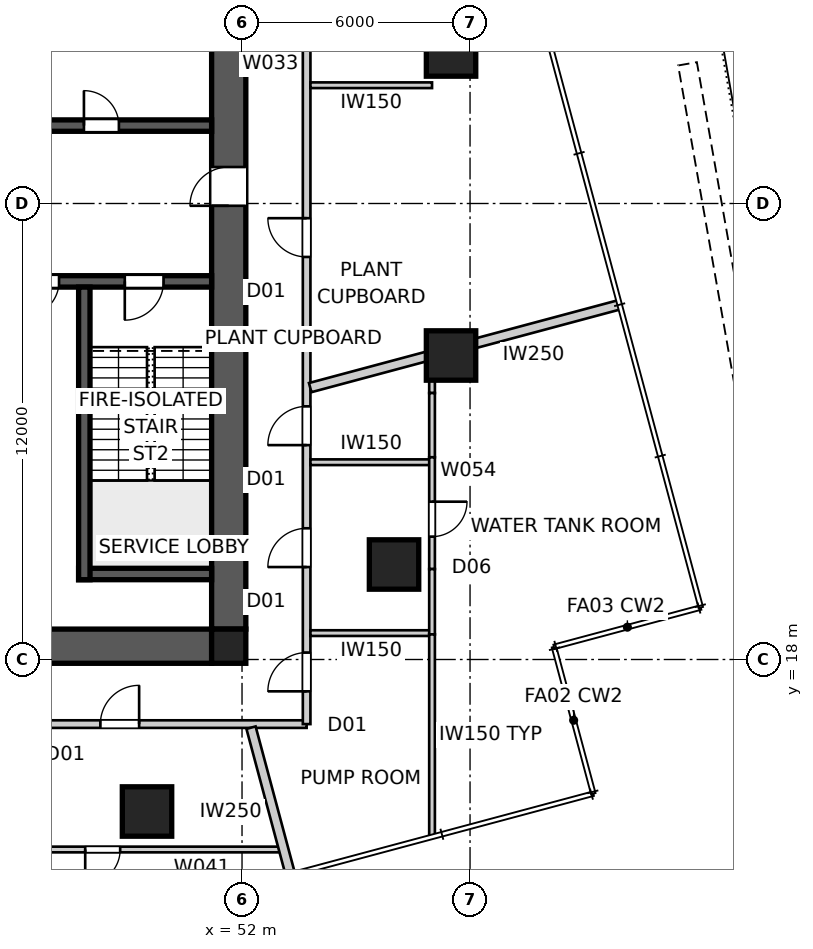
"""IFC4 building model, lengths in metres.
Left out: names, types, materials, properties, quantities, classifications, styles, units other than length and angle.
Written with IfcOpenShell. Run it as: python <this file> out.ifc"""

import sys

from ifc_helpers import new_model, si_unit, direction, frame, frame_2d, origin, origin_2d, place, context, subcontext, project, spatial, polyline, rectangle, outline, extrude, element, fill, save


model = new_model("IFC4")
c1 = context("Model", 3, precision=1e-05, world=origin(), true_north=direction((0.0, 1.0)))
c2 = subcontext(c1, "Body", "Model", "MODEL_VIEW")
j1 = project(units=[si_unit("LENGTHUNIT", "METRE"), si_unit("PLANEANGLEUNIT", "RADIAN")], contexts=[c1])
p1 = place(None, origin())
s1 = spatial("IfcSite", under=j1, at=p1, CompositionType="ELEMENT")
p2 = place(p1, origin())
s2 = spatial("IfcBuilding", under=s1, at=p2, CompositionType="ELEMENT")
p3 = place(p2, frame((0.0, 0.0, 106.6)))
s3 = spatial("IfcBuildingStorey", under=s2, at=p3, CompositionType="ELEMENT", Elevation=106.6)
p4 = place(p3, frame((51.2, 18.35, 0.0), z_axis=(0.0, 0.0, 1.0), x_axis=(-1.0, 0.0, 0.0)))
e1 = element("IfcWall", 1, at=p4, inside=s3, PredefinedType="SHEAR", context=c2, shape_type="SweptSolid", body=[
    extrude(outline(polyline([(0.0, -0.45), (22.4, -0.45), (22.4, -0.025), (22.85, -0.025), (22.85, 0.025), (22.4, 0.025), (22.4, 0.45), (0.0, 0.45), (0.0, 0.025), (-0.45, 0.025), (-0.45, -0.025), (0.0, -0.025), (0.0, -0.45)])), origin(), (0.0, 0.0, 1.0), 5.0),
])
p5 = place(p3, frame((51.65, 18.8, 0.0), z_axis=(0.0, 0.0, 1.0), x_axis=(0.0, 1.0, 0.0)))
e2 = element("IfcWall", 2, at=p5, inside=s3, PredefinedType="SHEAR", context=c2, shape_type="SweptSolid", body=[
    extrude(outline(polyline([(0.0, -0.45), (22.4, -0.45), (22.4, -0.025), (22.85, -0.025), (22.85, 0.025), (22.4, 0.025), (22.4, 0.45), (0.0, 0.45), (0.0, 0.025), (-0.45, 0.025), (-0.45, -0.025), (0.0, -0.025), (0.0, -0.45)])), origin(), (0.0, 0.0, 1.0), 5.0),
])
p6 = place(p5, frame((11.14, 0.0, 0.0)))
e3 = element("IfcOpeningElement", 3, at=p6, cuts=e2, PredefinedType="OPENING", context=c2, shape_type="SweptSolid", body=[
    extrude(rectangle(XDim=1.02, YDim=2.4, at=frame_2d((0.51, 1.2))), frame((0.0, 0.46, 0.0), z_axis=(0.0, -1.0, 0.0), x_axis=(1.0, 0.0, 0.0)), (0.0, 0.0, 1.0), 0.92),
])
p7 = place(p3, frame((28.8, 32.05, 0.0), z_axis=(0.0, 0.0, 1.0), x_axis=(1.0, 0.0, 0.0)))
e4 = element("IfcWall", 4, at=p7, inside=s3, PredefinedType="SHEAR", context=c2, shape_type="SweptSolid", body=[
    extrude(rectangle(XDim=22.4, YDim=0.3, at=frame_2d((11.2, 0.0))), origin(), (0.0, 0.0, 1.0), 5.0),
])
p8 = place(p7, frame((19.04, 0.0, 0.0)))
e5 = element("IfcOpeningElement", 5, at=p8, cuts=e4, PredefinedType="OPENING", context=c2, shape_type="SweptSolid", body=[
    extrude(rectangle(XDim=0.92, YDim=2.1, at=frame_2d((0.46, 1.05))), frame((0.0, 0.16, 0.0), z_axis=(0.0, -1.0, 0.0), x_axis=(1.0, 0.0, 0.0)), (0.0, 0.0, 1.0), 0.32),
])
p9 = place(p7, frame((1.265, 0.0, 0.0)))
e6 = element("IfcOpeningElement", 6, at=p9, cuts=e4, PredefinedType="OPENING", context=c2, shape_type="SweptSolid", body=[
    extrude(rectangle(XDim=1.02, YDim=2.1, at=frame_2d((0.51, 1.05))), frame((0.0, 0.16, 0.0), z_axis=(0.0, -1.0, 0.0), x_axis=(1.0, 0.0, 0.0)), (0.0, 0.0, 1.0), 0.32),
])
p10 = place(p7, frame((4.015, 0.0, 0.0)))
e7 = element("IfcOpeningElement", 7, at=p10, cuts=e4, PredefinedType="OPENING", context=c2, shape_type="SweptSolid", body=[
    extrude(rectangle(XDim=0.92, YDim=2.1, at=frame_2d((0.46, 1.05))), frame((0.0, 0.16, 0.0), z_axis=(0.0, -1.0, 0.0), x_axis=(1.0, 0.0, 0.0)), (0.0, 0.0, 1.0), 0.32),
])
p11 = place(p7, frame((6.45, 0.0, 0.0)))
e8 = element("IfcOpeningElement", 8, at=p11, cuts=e4, PredefinedType="OPENING", context=c2, shape_type="SweptSolid", body=[
    extrude(rectangle(XDim=1.1, YDim=2.1, at=frame_2d((0.55, 1.05))), frame((0.0, 0.16, 0.0), z_axis=(0.0, -1.0, 0.0), x_axis=(1.0, 0.0, 0.0)), (0.0, 0.0, 1.0), 0.32),
])
p12 = place(p7, frame((9.25, 0.0, 0.0)))
e9 = element("IfcOpeningElement", 9, at=p12, cuts=e4, PredefinedType="OPENING", context=c2, shape_type="SweptSolid", body=[
    extrude(rectangle(XDim=1.1, YDim=2.1, at=frame_2d((0.55, 1.05))), frame((0.0, 0.16, 0.0), z_axis=(0.0, -1.0, 0.0), x_axis=(1.0, 0.0, 0.0)), (0.0, 0.0, 1.0), 0.32),
])
p13 = place(p7, frame((14.85, 0.0, 0.0)))
e10 = element("IfcOpeningElement", 10, at=p13, cuts=e4, PredefinedType="OPENING", context=c2, shape_type="SweptSolid", body=[
    extrude(rectangle(XDim=1.1, YDim=2.1, at=frame_2d((0.55, 1.05))), frame((0.0, 0.16, 0.0), z_axis=(0.0, -1.0, 0.0), x_axis=(1.0, 0.0, 0.0)), (0.0, 0.0, 1.0), 0.32),
])
p14 = place(p3, frame((51.2, 27.95, 0.0), z_axis=(0.0, 0.0, 1.0), x_axis=(-1.0, 0.0, 0.0)))
e11 = element("IfcWall", 11, at=p14, inside=s3, PredefinedType="SHEAR", context=c2, shape_type="SweptSolid", body=[
    extrude(rectangle(XDim=22.4, YDim=0.3, at=frame_2d((11.2, 0.0))), origin(), (0.0, 0.0, 1.0), 5.0),
])
p15 = place(p14, frame((19.04, 0.0, 0.0)))
e12 = element("IfcOpeningElement", 12, at=p15, cuts=e11, PredefinedType="OPENING", context=c2, shape_type="SweptSolid", body=[
    extrude(rectangle(XDim=0.92, YDim=2.1, at=frame_2d((0.46, 1.05))), frame((0.0, 0.16, 0.0), z_axis=(0.0, -1.0, 0.0), x_axis=(1.0, 0.0, 0.0)), (0.0, 0.0, 1.0), 0.32),
])
p16 = place(p14, frame((1.265, 0.0, 0.0)))
e13 = element("IfcOpeningElement", 13, at=p16, cuts=e11, PredefinedType="OPENING", context=c2, shape_type="SweptSolid", body=[
    extrude(rectangle(XDim=1.02, YDim=2.1, at=frame_2d((0.51, 1.05))), frame((0.0, 0.16, 0.0), z_axis=(0.0, -1.0, 0.0), x_axis=(1.0, 0.0, 0.0)), (0.0, 0.0, 1.0), 0.32),
])
p17 = place(p14, frame((4.015, 0.0, 0.0)))
e14 = element("IfcOpeningElement", 14, at=p17, cuts=e11, PredefinedType="OPENING", context=c2, shape_type="SweptSolid", body=[
    extrude(rectangle(XDim=0.92, YDim=2.1, at=frame_2d((0.46, 1.05))), frame((0.0, 0.16, 0.0), z_axis=(0.0, -1.0, 0.0), x_axis=(1.0, 0.0, 0.0)), (0.0, 0.0, 1.0), 0.32),
])
p18 = place(p14, frame((14.85, 0.0, 0.0)))
e15 = element("IfcOpeningElement", 15, at=p18, cuts=e11, PredefinedType="OPENING", context=c2, shape_type="SweptSolid", body=[
    extrude(rectangle(XDim=1.1, YDim=2.1, at=frame_2d((0.55, 1.05))), frame((0.0, 0.16, 0.0), z_axis=(0.0, -1.0, 0.0), x_axis=(1.0, 0.0, 0.0)), (0.0, 0.0, 1.0), 0.32),
])
p19 = place(p3, frame((47.85, 27.8, 0.0), z_axis=(0.0, 0.0, 1.0), x_axis=(0.0, -1.0, 0.0)))
e16 = element("IfcWall", 16, at=p19, inside=s3, PredefinedType="SHEAR", context=c2, shape_type="SweptSolid", body=[
    extrude(rectangle(XDim=7.7, YDim=0.3, at=frame_2d((3.85, 0.0))), origin(), (0.0, 0.0, 1.0), 5.0),
])
p20 = place(p3, frame((51.2, 20.25, 0.0), z_axis=(0.0, 0.0, 1.0), x_axis=(-1.0, 0.0, 0.0)))
e17 = element("IfcWall", 17, at=p20, inside=s3, PredefinedType="SHEAR", context=c2, shape_type="SweptSolid", body=[
    extrude(rectangle(XDim=3.5, YDim=0.3, at=frame_2d((1.75, 0.0))), origin(), (0.0, 0.0, 1.0), 5.0),
])
p21 = place(p3, frame((51.65, 18.35, 0.0), z_axis=(0.0, 0.0, 1.0), x_axis=(1.0, 0.0, 0.0)))
e18 = element("IfcColumn", 18, at=p21, inside=s3, PredefinedType="COLUMN", context=c2, shape_type="SweptSolid", body=[
    extrude(rectangle(XDim=0.9, YDim=0.9, at=origin_2d()), origin(), (0.0, 0.0, 1.0), 5.0),
])
for number, where, z_axis, x_axis in (
    (19, (57.5, 26.0, 0.0), (0.0, 0.0, 1.0), (1.0, 0.0, 0.0)),
    (20, (57.5, 34.0, 0.0), (0.0, 0.0, 1.0), (1.0, 0.0, 0.0)),
    (21, (49.5, 14.0, 0.0), (0.0, 0.0, 1.0), (1.0, 0.0, 0.0)),
    (22, (56.0, 20.5, 0.0), (0.0, 0.0, 1.0), (1.0, 0.0, 0.0)),
):
    element("IfcColumn", number, at=place(p3, frame(where, z_axis=z_axis, x_axis=x_axis)), inside=s3, PredefinedType="COLUMN", context=c2, shape_type="SweptSolid", body=[
        extrude(rectangle(XDim=1.3, YDim=1.3, at=origin_2d()), origin(), (0.0, 0.0, 1.0), 5.0),
    ])
p22 = place(p3, frame((26.3, 16.3, 0.0), z_axis=(0.0, 0.0, 1.0), x_axis=(1.0, 0.0, 0.0)))
e23 = element("IfcWall", 23, at=p22, inside=s3, PredefinedType="PARTITIONING", context=c2, shape_type="SweptSolid", body=[
    extrude(rectangle(XDim=27.4, YDim=0.2, at=frame_2d((13.7, 0.0))), origin(), (0.0, 0.0, 1.0), 4.85),
])
p23 = place(p22, frame((21.972, 0.0, 0.0)))
e24 = element("IfcOpeningElement", 24, at=p23, cuts=e23, PredefinedType="OPENING", context=c2, shape_type="SweptSolid", body=[
    extrude(rectangle(XDim=1.02, YDim=2.34, at=frame_2d((0.51, 1.17))), frame((0.0, 0.11, 0.0), z_axis=(0.0, -1.0, 0.0), x_axis=(1.0, 0.0, 0.0)), (0.0, 0.0, 1.0), 0.22),
])
p24 = place(p22, frame((15.991, 0.0, 0.0)))
e25 = element("IfcOpeningElement", 25, at=p24, cuts=e23, PredefinedType="OPENING", context=c2, shape_type="SweptSolid", body=[
    extrude(rectangle(XDim=1.02, YDim=2.34, at=frame_2d((0.51, 1.17))), frame((0.0, 0.11, 0.0), z_axis=(0.0, -1.0, 0.0), x_axis=(1.0, 0.0, 0.0)), (0.0, 0.0, 1.0), 0.22),
])
p25 = place(p22, frame((10.853, 0.0, 0.0)))
e26 = element("IfcOpeningElement", 26, at=p25, cuts=e23, PredefinedType="OPENING", context=c2, shape_type="SweptSolid", body=[
    extrude(rectangle(XDim=1.02, YDim=2.34, at=frame_2d((0.51, 1.17))), frame((0.0, 0.11, 0.0), z_axis=(0.0, -1.0, 0.0), x_axis=(1.0, 0.0, 0.0)), (0.0, 0.0, 1.0), 0.22),
])
p26 = place(p22, frame((4.133, 0.0, 0.0)))
e27 = element("IfcOpeningElement", 27, at=p26, cuts=e23, PredefinedType="OPENING", context=c2, shape_type="SweptSolid", body=[
    extrude(rectangle(XDim=1.02, YDim=2.34, at=frame_2d((0.51, 1.17))), frame((0.0, 0.11, 0.0), z_axis=(0.0, -1.0, 0.0), x_axis=(1.0, 0.0, 0.0)), (0.0, 0.0, 1.0), 0.22),
])
p27 = place(p22, frame((0.862, 0.0, 0.0)))
e28 = element("IfcOpeningElement", 28, at=p27, cuts=e23, PredefinedType="OPENING", context=c2, shape_type="SweptSolid", body=[
    extrude(rectangle(XDim=1.02, YDim=2.34, at=frame_2d((0.51, 1.17))), frame((0.0, 0.11, 0.0), z_axis=(0.0, -1.0, 0.0), x_axis=(1.0, 0.0, 0.0)), (0.0, 0.0, 1.0), 0.22),
])
p28 = place(p22, frame((7.342, 0.0, 0.0)))
e29 = element("IfcOpeningElement", 29, at=p28, cuts=e23, PredefinedType="OPENING", context=c2, shape_type="SweptSolid", body=[
    extrude(rectangle(XDim=1.02, YDim=2.34, at=frame_2d((0.51, 1.17))), frame((0.0, 0.11, 0.0), z_axis=(0.0, -1.0, 0.0), x_axis=(1.0, 0.0, 0.0)), (0.0, 0.0, 1.0), 0.22),
])
p29 = place(p3, frame((53.7, 16.3, 0.0), z_axis=(0.0, 0.0, 1.0), x_axis=(0.0, 1.0, 0.0)))
e30 = element("IfcWall", 30, at=p29, inside=s3, PredefinedType="PARTITIONING", context=c2, shape_type="SweptSolid", body=[
    extrude(rectangle(XDim=27.4, YDim=0.2, at=frame_2d((13.7, 0.0))), origin(), (0.0, 0.0, 1.0), 4.85),
])
p30 = place(p29, frame((21.421, 0.0, 0.0)))
e31 = element("IfcOpeningElement", 31, at=p30, cuts=e30, PredefinedType="OPENING", context=c2, shape_type="SweptSolid", body=[
    extrude(rectangle(XDim=1.02, YDim=2.34, at=frame_2d((0.51, 1.17))), frame((0.0, 0.11, 0.0), z_axis=(0.0, -1.0, 0.0), x_axis=(1.0, 0.0, 0.0)), (0.0, 0.0, 1.0), 0.22),
])
p31 = place(p29, frame((12.293, 0.0, 0.0)))
e32 = element("IfcOpeningElement", 32, at=p31, cuts=e30, PredefinedType="OPENING", context=c2, shape_type="SweptSolid", body=[
    extrude(rectangle(XDim=1.02, YDim=2.34, at=frame_2d((0.51, 1.17))), frame((0.0, 0.11, 0.0), z_axis=(0.0, -1.0, 0.0), x_axis=(1.0, 0.0, 0.0)), (0.0, 0.0, 1.0), 0.22),
])
p32 = place(p29, frame((4.133, 0.0, 0.0)))
e33 = element("IfcOpeningElement", 33, at=p32, cuts=e30, PredefinedType="OPENING", context=c2, shape_type="SweptSolid", body=[
    extrude(rectangle(XDim=1.02, YDim=2.34, at=frame_2d((0.51, 1.17))), frame((0.0, 0.11, 0.0), z_axis=(0.0, -1.0, 0.0), x_axis=(1.0, 0.0, 0.0)), (0.0, 0.0, 1.0), 0.22),
])
p33 = place(p29, frame((0.862, 0.0, 0.0)))
e34 = element("IfcOpeningElement", 34, at=p33, cuts=e30, PredefinedType="OPENING", context=c2, shape_type="SweptSolid", body=[
    extrude(rectangle(XDim=1.02, YDim=2.34, at=frame_2d((0.51, 1.17))), frame((0.0, 0.11, 0.0), z_axis=(0.0, -1.0, 0.0), x_axis=(1.0, 0.0, 0.0)), (0.0, 0.0, 1.0), 0.22),
])
p34 = place(p29, frame((7.342, 0.0, 0.0)))
e35 = element("IfcOpeningElement", 35, at=p34, cuts=e30, PredefinedType="OPENING", context=c2, shape_type="SweptSolid", body=[
    extrude(rectangle(XDim=1.02, YDim=2.34, at=frame_2d((0.51, 1.17))), frame((0.0, 0.11, 0.0), z_axis=(0.0, -1.0, 0.0), x_axis=(1.0, 0.0, 0.0)), (0.0, 0.0, 1.0), 0.22),
])
p35 = place(p3, frame((53.275, 12.334, 0.0), z_axis=(0.0, 0.0, 1.0), x_axis=(-0.258807108475, 0.96592902462, 0.0)))
e36 = element("IfcWall", 36, at=p35, inside=s3, PredefinedType="PARTITIONING", context=c2, shape_type="SweptSolid", body=[
    extrude(rectangle(XDim=4.009, YDim=0.25, at=frame_2d((2.004, 0.0))), origin(), (0.0, 0.0, 1.0), 4.85),
])
p36 = place(p3, frame((61.937, 27.337, 0.0), z_axis=(0.0, 0.0, 1.0), x_axis=(-0.965927110389, -0.25881425273, 0.0)))
e37 = element("IfcWall", 37, at=p36, inside=s3, PredefinedType="PARTITIONING", context=c2, shape_type="SweptSolid", body=[
    extrude(rectangle(XDim=8.43, YDim=0.25, at=frame_2d((4.215, 0.0))), origin(), (0.0, 0.0, 1.0), 4.85),
])
p37 = place(p3, frame((53.096, 13.0, 0.0), z_axis=(0.0, 0.0, 1.0), x_axis=(-1.0, 0.0, 0.0)))
e38 = element("IfcWall", 38, at=p37, inside=s3, PredefinedType="SOLIDWALL", context=c2, shape_type="SweptSolid", body=[
    extrude(rectangle(XDim=6.418, YDim=0.15, at=frame_2d((3.209, 0.0))), origin(), (0.0, 0.0, 1.0), 4.85),
])
p38 = place(p37, frame((4.302, 0.0, 0.0)))
e39 = element("IfcOpeningElement", 39, at=p38, cuts=e38, PredefinedType="OPENING", context=c2, shape_type="SweptSolid", body=[
    extrude(rectangle(XDim=0.92, YDim=2.1, at=frame_2d((0.46, 1.05))), frame((0.0, 0.085, 0.0), z_axis=(0.0, -1.0, 0.0), x_axis=(1.0, 0.0, 0.0)), (0.0, 0.0, 1.0), 0.17),
])
for number, where, z_axis, x_axis in (
    (40, (57.0, 18.695, 0.0), (0.0, 0.0, 1.0), (-1.0, 0.0, 0.0)),
    (41, (53.8, 23.191, 0.0), (0.0, 0.0, 1.0), (1.0, 0.0, 0.0)),
):
    element("IfcWall", number, at=place(p3, frame(where, z_axis=z_axis, x_axis=x_axis)), inside=s3, PredefinedType="SOLIDWALL", context=c2, shape_type="SweptSolid", body=[
        extrude(rectangle(XDim=3.2, YDim=0.15, at=frame_2d((1.6, 0.0))), origin(), (0.0, 0.0, 1.0), 4.85),
    ])
p39 = place(p3, frame((57.0, 26.014, 0.0), z_axis=(0.0, 0.0, 1.0), x_axis=(0.0, -1.0, 0.0)))
e42 = element("IfcWall", 42, at=p39, inside=s3, PredefinedType="SOLIDWALL", context=c2, shape_type="SweptSolid", body=[
    extrude(rectangle(XDim=1.002, YDim=0.15, at=frame_2d((0.501, 0.0))), origin(), (0.0, 0.0, 1.0), 4.85),
])
p40 = place(p3, frame((57.0, 25.012, 0.0), z_axis=(0.0, 0.0, 1.0), x_axis=(0.0, -1.0, 0.0)))
e43 = element("IfcWall", 43, at=p40, inside=s3, PredefinedType="SOLIDWALL", context=c2, shape_type="SweptSolid", body=[
    extrude(rectangle(XDim=1.69, YDim=0.15, at=frame_2d((0.845, 0.0))), origin(), (0.0, 0.0, 1.0), 3.85),
])
p41 = place(p3, frame((57.0, 23.322, 0.0), z_axis=(0.0, 0.0, 1.0), x_axis=(0.0, -1.0, 0.0)))
e44 = element("IfcWall", 44, at=p41, inside=s3, PredefinedType="SOLIDWALL", context=c2, shape_type="SweptSolid", body=[
    extrude(rectangle(XDim=2.942, YDim=0.15, at=frame_2d((1.471, 0.0))), origin(), (0.0, 0.0, 1.0), 4.85),
])
p42 = place(p41, frame((1.169, 0.0, 0.0)))
e45 = element("IfcOpeningElement", 45, at=p42, cuts=e44, PredefinedType="OPENING", context=c2, shape_type="SweptSolid", body=[
    extrude(rectangle(XDim=0.92, YDim=2.1, at=frame_2d((0.46, 1.05))), frame((0.0, 0.085, 0.0), z_axis=(0.0, -1.0, 0.0), x_axis=(1.0, 0.0, 0.0)), (0.0, 0.0, 1.0), 0.17),
])
p43 = place(p3, frame((57.0, 20.38, 0.0), z_axis=(0.0, 0.0, 1.0), x_axis=(0.0, -1.0, 0.0)))
e46 = element("IfcWall", 46, at=p43, inside=s3, PredefinedType="SOLIDWALL", context=c2, shape_type="SweptSolid", body=[
    extrude(rectangle(XDim=1.719, YDim=0.15, at=frame_2d((0.859, 0.0))), origin(), (0.0, 0.0, 1.0), 4.049),
])
p44 = place(p3, frame((57.0, 18.661, 0.0), z_axis=(0.0, 0.0, 1.0), x_axis=(0.0, -1.0, 0.0)))
e47 = element("IfcWall", 47, at=p44, inside=s3, PredefinedType="SOLIDWALL", context=c2, shape_type="SweptSolid", body=[
    extrude(rectangle(XDim=5.287, YDim=0.15, at=frame_2d((2.644, 0.0))), origin(), (0.0, 0.0, 1.0), 4.85),
])
p45 = place(p3, frame((57.0, 33.112, 0.0), z_axis=(0.0, 0.0, 1.0), x_axis=(-1.0, 0.0, 0.0)))
e48 = element("IfcWall", 48, at=p45, inside=s3, PredefinedType="SOLIDWALL", context=c2, shape_type="SweptSolid", body=[
    extrude(rectangle(XDim=3.2, YDim=0.15, at=frame_2d((1.6, 0.0))), origin(), (0.0, 0.0, 1.0), 4.85),
])
p46 = place(p8, origin())
e49 = element("IfcDoor", 49, at=p46, inside=s3, OperationType="SINGLE_SWING_LEFT", PredefinedType="DOOR", context=c2, shape_type="SweptSolid", body=[
    extrude(rectangle(XDim=0.92, YDim=2.1, at=frame_2d((0.46, 1.05))), frame((0.0, 0.025, 0.0), z_axis=(0.0, -1.0, 0.0), x_axis=(1.0, 0.0, 0.0)), (0.0, 0.0, 1.0), 0.05),
])
fill(e5, e49)
p47 = place(p16, origin())
e50 = element("IfcDoor", 50, at=p47, inside=s3, OperationType="SINGLE_SWING_RIGHT", PredefinedType="DOOR", context=c2, shape_type="SweptSolid", body=[
    extrude(rectangle(XDim=1.02, YDim=2.1, at=frame_2d((0.51, 1.05))), frame((0.0, 0.025, 0.0), z_axis=(0.0, -1.0, 0.0), x_axis=(1.0, 0.0, 0.0)), (0.0, 0.0, 1.0), 0.05),
])
fill(e13, e50)
p48 = place(p17, origin())
e51 = element("IfcDoor", 51, at=p48, inside=s3, OperationType="SINGLE_SWING_RIGHT", PredefinedType="DOOR", context=c2, shape_type="SweptSolid", body=[
    extrude(rectangle(XDim=0.92, YDim=2.1, at=frame_2d((0.46, 1.05))), frame((0.0, 0.025, 0.0), z_axis=(0.0, -1.0, 0.0), x_axis=(1.0, 0.0, 0.0)), (0.0, 0.0, 1.0), 0.05),
])
fill(e14, e51)
p49 = place(p31, origin())
e52 = element("IfcDoor", 52, at=p49, inside=s3, OperationType="SINGLE_SWING_RIGHT", PredefinedType="DOOR", context=c2, shape_type="SweptSolid", body=[
    extrude(rectangle(XDim=1.02, YDim=2.34, at=frame_2d((0.51, 1.17))), frame((0.0, 0.025, 0.0), z_axis=(0.0, -1.0, 0.0), x_axis=(1.0, 0.0, 0.0)), (0.0, 0.0, 1.0), 0.05),
])
fill(e32, e52)
p50 = place(p23, origin())
e53 = element("IfcDoor", 53, at=p50, inside=s3, OperationType="SINGLE_SWING_RIGHT", PredefinedType="DOOR", context=c2, shape_type="SweptSolid", body=[
    extrude(rectangle(XDim=1.02, YDim=2.34, at=frame_2d((0.51, 1.17))), frame((0.0, 0.025, 0.0), z_axis=(0.0, -1.0, 0.0), x_axis=(1.0, 0.0, 0.0)), (0.0, 0.0, 1.0), 0.05),
])
fill(e24, e53)
p51 = place(p32, origin())
e54 = element("IfcDoor", 54, at=p51, inside=s3, OperationType="SINGLE_SWING_LEFT", PredefinedType="DOOR", context=c2, shape_type="SweptSolid", body=[
    extrude(rectangle(XDim=1.02, YDim=2.34, at=frame_2d((0.51, 1.17))), frame((0.0, 0.025, 0.0), z_axis=(0.0, -1.0, 0.0), x_axis=(1.0, 0.0, 0.0)), (0.0, 0.0, 1.0), 0.05),
])
fill(e33, e54)
p52 = place(p33, origin())
e55 = element("IfcDoor", 55, at=p52, inside=s3, OperationType="SINGLE_SWING_LEFT", PredefinedType="DOOR", context=c2, shape_type="SweptSolid", body=[
    extrude(rectangle(XDim=1.02, YDim=2.34, at=frame_2d((0.51, 1.17))), frame((0.0, 0.025, 0.0), z_axis=(0.0, -1.0, 0.0), x_axis=(1.0, 0.0, 0.0)), (0.0, 0.0, 1.0), 0.05),
])
fill(e34, e55)
p53 = place(p34, origin())
e56 = element("IfcDoor", 56, at=p53, inside=s3, OperationType="SINGLE_SWING_LEFT", PredefinedType="DOOR", context=c2, shape_type="SweptSolid", body=[
    extrude(rectangle(XDim=1.02, YDim=2.34, at=frame_2d((0.51, 1.17))), frame((0.0, 0.025, 0.0), z_axis=(0.0, -1.0, 0.0), x_axis=(1.0, 0.0, 0.0)), (0.0, 0.0, 1.0), 0.05),
])
fill(e35, e56)
p54 = place(p38, origin())
e57 = element("IfcDoor", 57, at=p54, inside=s3, OperationType="SINGLE_SWING_RIGHT", PredefinedType="DOOR", context=c2, shape_type="SweptSolid", body=[
    extrude(rectangle(XDim=0.92, YDim=2.1, at=frame_2d((0.46, 1.05))), frame((0.0, 0.025, 0.0), z_axis=(0.0, -1.0, 0.0), x_axis=(1.0, 0.0, 0.0)), (0.0, 0.0, 1.0), 0.05),
])
fill(e39, e57)
p55 = place(p42, origin())
e58 = element("IfcDoor", 58, at=p55, inside=s3, OperationType="SINGLE_SWING_LEFT", PredefinedType="DOOR", context=c2, shape_type="SweptSolid", body=[
    extrude(rectangle(XDim=0.92, YDim=2.1, at=frame_2d((0.46, 1.05))), frame((0.0, 0.025, 0.0), z_axis=(0.0, -1.0, 0.0), x_axis=(1.0, 0.0, 0.0)), (0.0, 0.0, 1.0), 0.05),
])
fill(e45, e58)
p56 = place(p6, origin())
e59 = element("IfcDoor", 59, at=p56, inside=s3, OperationType="SINGLE_SWING_LEFT", PredefinedType="DOOR", context=c2, shape_type="SweptSolid", body=[
    extrude(rectangle(XDim=1.02, YDim=2.4, at=frame_2d((0.51, 1.2))), frame((0.0, 0.025, 0.0), z_axis=(0.0, -1.0, 0.0), x_axis=(1.0, 0.0, 0.0)), (0.0, 0.0, 1.0), 0.05),
])
fill(e3, e59)
save(model, sys.argv[1])
